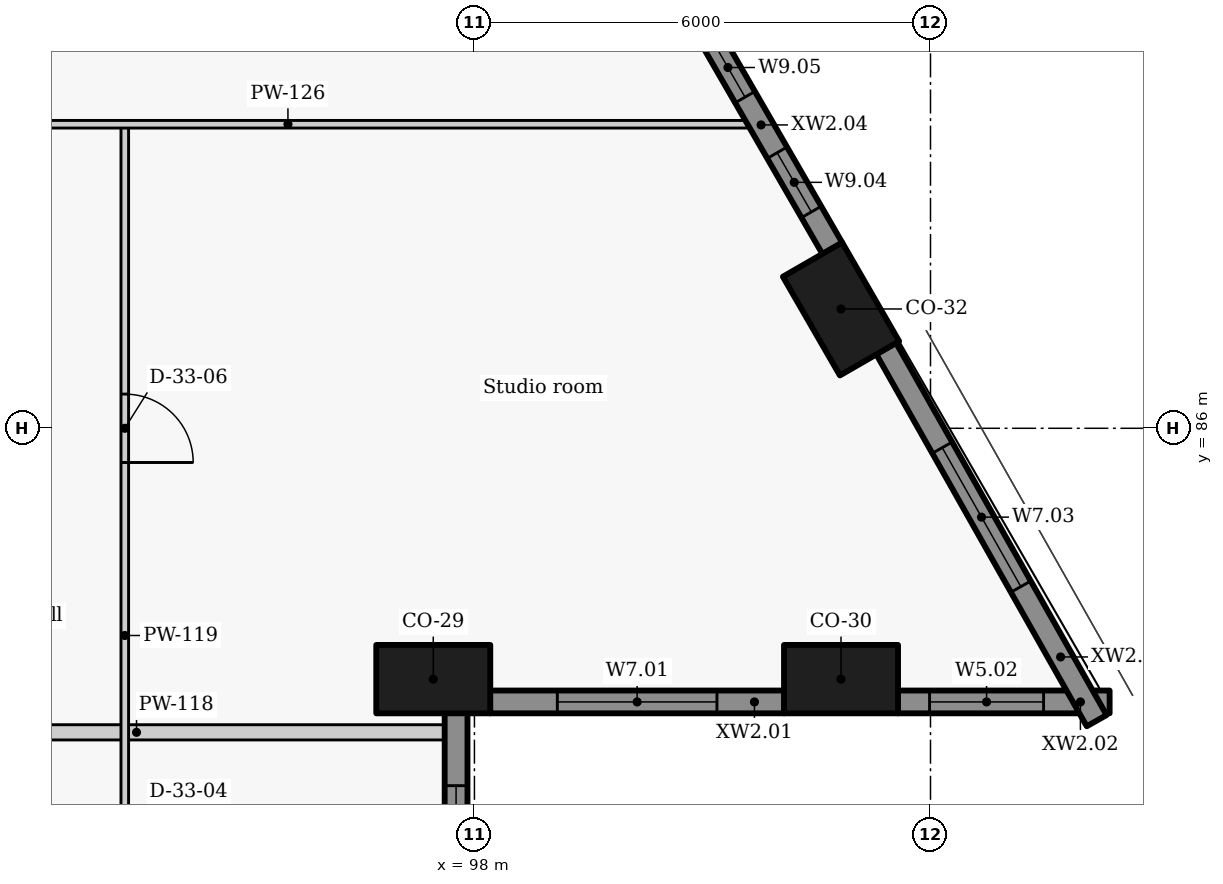
"""IFC4 building model, lengths in metres.
Left out: names, types, materials, properties, quantities, classifications, styles, units other than length and angle.
Written with IfcOpenShell. Run it as: python <this file> out.ifc"""

import sys

from ifc_helpers import new_model, si_unit, direction, frame, frame_2d, origin, origin_2d, place, context, subcontext, project, spatial, rectangle, extrude, element, fill, save


model = new_model("IFC4")
c1 = context("Model", 3, precision=1e-05, world=origin(), true_north=direction((0.0, 1.0)))
c2 = subcontext(c1, "Body", "Model", "MODEL_VIEW")
j1 = project(units=[si_unit("LENGTHUNIT", "METRE"), si_unit("PLANEANGLEUNIT", "RADIAN")], contexts=[c1])
p1 = place(None, origin())
s1 = spatial("IfcSite", under=j1, at=p1, CompositionType="ELEMENT")
p2 = place(p1, origin())
s2 = spatial("IfcBuilding", under=s1, at=p2, CompositionType="ELEMENT")
p3 = place(p2, frame((0.0, 0.0, 44.7)))
s3 = spatial("IfcBuildingStorey", under=s2, at=p3, CompositionType="ELEMENT", Elevation=44.7)
for number, where, z_axis, x_axis in (
    (1, (97.458, 82.7, 0.0), (0.0, 0.0, 1.0), (1.0, 0.0, 0.0)),
    (2, (102.823, 82.7, 0.0), (0.0, 0.0, 1.0), (1.0, 0.0, 0.0)),
    (3, (102.823, 87.57, 0.0), (0.0, 0.0, 1.0), (-0.5, 0.866, 0.0)),
):
    element("IfcColumn", number, at=place(p3, frame(where, z_axis=z_axis, x_axis=x_axis)), inside=s3, PredefinedType="COLUMN", context=c2, shape_type="SweptSolid", body=[
        extrude(rectangle(XDim=1.5, YDim=0.9, at=origin_2d()), origin(), (0.0, 0.0, 1.0), 3.3),
    ])
p4 = place(p3, frame((98.204, 82.4, 0.0), z_axis=(0.0, 0.0, 1.0), x_axis=(1.0, 0.0, 0.0)))
e4 = element("IfcWall", 4, at=p4, inside=s3, PredefinedType="SOLIDWALL", context=c2, shape_type="SweptSolid", body=[
    extrude(rectangle(XDim=3.873, YDim=0.3, at=frame_2d((1.936, 0.0))), origin(), (0.0, 0.0, 1.0), 2.425),
])
p5 = place(p4, frame((0.886, 0.0, 0.9)))
e5 = element("IfcOpeningElement", 5, at=p5, cuts=e4, PredefinedType="OPENING", context=c2, shape_type="SweptSolid", body=[
    extrude(rectangle(XDim=2.1, YDim=1.1, at=frame_2d((1.05, 0.55))), frame((0.0, 0.16, 0.0), z_axis=(0.0, -1.0, 0.0), x_axis=(1.0, 0.0, 0.0)), (0.0, 0.0, 1.0), 0.32),
])
p6 = place(p3, frame((103.569, 82.4, 0.0), z_axis=(0.0, 0.0, 1.0), x_axis=(1.0, 0.0, 0.0)))
e6 = element("IfcWall", 6, at=p6, inside=s3, PredefinedType="SOLIDWALL", context=c2, shape_type="SweptSolid", body=[
    extrude(rectangle(XDim=2.788, YDim=0.3, at=frame_2d((1.394, 0.0))), origin(), (0.0, 0.0, 1.0), 2.425),
])
p7 = place(p6, frame((0.419, 0.0, 0.9)))
e7 = element("IfcOpeningElement", 7, at=p7, cuts=e6, PredefinedType="OPENING", context=c2, shape_type="SweptSolid", body=[
    extrude(rectangle(XDim=1.5, YDim=1.1, at=frame_2d((0.75, 0.55))), frame((0.0, 0.16, 0.0), z_axis=(0.0, -1.0, 0.0), x_axis=(1.0, 0.0, 0.0)), (0.0, 0.0, 1.0), 0.32),
])
p8 = place(p3, frame((106.186, 82.153, 0.0), z_axis=(0.0, 0.0, 1.0), x_axis=(-0.492363204642, 0.870389840655, 0.0)))
e8 = element("IfcWall", 8, at=p8, inside=s3, PredefinedType="SOLIDWALL", context=c2, shape_type="SweptSolid", body=[
    extrude(rectangle(XDim=5.626, YDim=0.3, at=frame_2d((2.813, 0.0))), origin(), (0.0, 0.0, 1.0), 2.425),
])
p9 = place(p8, frame((2.026, 0.0, 0.9)))
e9 = element("IfcOpeningElement", 9, at=p9, cuts=e8, PredefinedType="OPENING", context=c2, shape_type="SweptSolid", body=[
    extrude(rectangle(XDim=2.1, YDim=1.1, at=frame_2d((1.05, 0.55))), frame((0.0, 0.16, 0.0), z_axis=(0.0, -1.0, 0.0), x_axis=(1.0, 0.0, 0.0)), (0.0, 0.0, 1.0), 0.32),
])
p10 = place(p3, frame((102.71, 88.366, 0.0), z_axis=(0.0, 0.0, 1.0), x_axis=(-0.499977402622, 0.866038449993, 0.0)))
e10 = element("IfcWall", 10, at=p10, inside=s3, PredefinedType="SOLIDWALL", context=c2, shape_type="SweptSolid", body=[
    extrude(rectangle(XDim=3.537, YDim=0.3, at=frame_2d((1.769, 0.0))), origin(), (0.0, 0.0, 1.0), 2.425),
])
p11 = place(p10, frame((0.555, 0.0, 0.9)))
e11 = element("IfcOpeningElement", 11, at=p11, cuts=e10, PredefinedType="OPENING", context=c2, shape_type="SweptSolid", body=[
    extrude(rectangle(XDim=0.9, YDim=1.1, at=frame_2d((0.45, 0.55))), frame((0.0, 0.16, 0.0), z_axis=(0.0, -1.0, 0.0), x_axis=(1.0, 0.0, 0.0)), (0.0, 0.0, 1.0), 0.32),
])
p12 = place(p10, frame((2.299, 0.0, 0.9)))
e12 = element("IfcOpeningElement", 12, at=p12, cuts=e10, PredefinedType="OPENING", context=c2, shape_type="SweptSolid", body=[
    extrude(rectangle(XDim=0.9, YDim=1.1, at=frame_2d((0.45, 0.55))), frame((0.0, 0.16, 0.0), z_axis=(0.0, -1.0, 0.0), x_axis=(1.0, 0.0, 0.0)), (0.0, 0.0, 1.0), 0.32),
])
p13 = place(p3, frame((97.758, 78.046, 0.0), z_axis=(0.0, 0.0, 1.0), x_axis=(0.0, 1.0, 0.0)))
e13 = element("IfcWall", 13, at=p13, inside=s3, PredefinedType="SOLIDWALL", context=c2, shape_type="SweptSolid", body=[
    extrude(rectangle(XDim=4.208, YDim=0.3, at=frame_2d((2.104, 0.0))), origin(), (0.0, 0.0, 1.0), 2.425),
])
p14 = place(p13, frame((1.752, 0.0, 0.9)))
e14 = element("IfcOpeningElement", 14, at=p14, cuts=e13, PredefinedType="OPENING", context=c2, shape_type="SweptSolid", body=[
    extrude(rectangle(XDim=1.5, YDim=1.1, at=frame_2d((0.75, 0.55))), frame((0.0, 0.16, 0.0), z_axis=(0.0, -1.0, 0.0), x_axis=(1.0, 0.0, 0.0)), (0.0, 0.0, 1.0), 0.32),
])
p15 = place(p3, frame((89.5, 82.0, 0.0), z_axis=(0.0, 0.0, 1.0), x_axis=(1.0, 0.0, 0.0)))
e15 = element("IfcWall", 15, at=p15, inside=s3, PredefinedType="PARTITIONING", context=c2, shape_type="SweptSolid", body=[
    extrude(rectangle(XDim=8.108, YDim=0.2, at=frame_2d((4.054, 0.0))), origin(), (0.0, 0.0, 1.0), 2.405),
])
p16 = place(p3, frame((93.4, 90.0, 0.0), z_axis=(0.0, 0.0, 1.0), x_axis=(0.0, -1.0, 0.0)))
e16 = element("IfcWall", 16, at=p16, inside=s3, PredefinedType="PARTITIONING", context=c2, shape_type="SweptSolid", body=[
    extrude(rectangle(XDim=18.0, YDim=0.1, at=frame_2d((9.0, 0.0))), origin(), (0.0, 0.0, 1.0), 3.025),
])
p17 = place(p16, frame((16.098, 0.0, 0.0)))
e17 = element("IfcOpeningElement", 17, at=p17, cuts=e16, PredefinedType="OPENING", context=c2, shape_type="SweptSolid", body=[
    extrude(rectangle(XDim=0.9, YDim=2.1, at=frame_2d((0.45, 1.05))), frame((0.0, 0.06, 0.0), z_axis=(0.0, -1.0, 0.0), x_axis=(1.0, 0.0, 0.0)), (0.0, 0.0, 1.0), 0.12),
])
p18 = place(p16, frame((12.55, 0.0, 0.0)))
e18 = element("IfcOpeningElement", 18, at=p18, cuts=e16, PredefinedType="OPENING", context=c2, shape_type="SweptSolid", body=[
    extrude(rectangle(XDim=0.9, YDim=2.1, at=frame_2d((0.45, 1.05))), frame((0.0, 0.06, 0.0), z_axis=(0.0, -1.0, 0.0), x_axis=(1.0, 0.0, 0.0)), (0.0, 0.0, 1.0), 0.12),
])
p19 = place(p16, frame((9.002, 0.0, 0.0)))
e19 = element("IfcOpeningElement", 19, at=p19, cuts=e16, PredefinedType="OPENING", context=c2, shape_type="SweptSolid", body=[
    extrude(rectangle(XDim=0.9, YDim=2.1, at=frame_2d((0.45, 1.05))), frame((0.0, 0.06, 0.0), z_axis=(0.0, -1.0, 0.0), x_axis=(1.0, 0.0, 0.0)), (0.0, 0.0, 1.0), 0.12),
])
p20 = place(p16, frame((3.55, 0.0, 0.0)))
e20 = element("IfcOpeningElement", 20, at=p20, cuts=e16, PredefinedType="OPENING", context=c2, shape_type="SweptSolid", body=[
    extrude(rectangle(XDim=0.9, YDim=2.1, at=frame_2d((0.45, 1.05))), frame((0.0, 0.06, 0.0), z_axis=(0.0, -1.0, 0.0), x_axis=(1.0, 0.0, 0.0)), (0.0, 0.0, 1.0), 0.12),
])
p21 = place(p3, frame((89.5, 90.0, 0.0), z_axis=(0.0, 0.0, 1.0), x_axis=(1.0, 0.0, 0.0)))
e21 = element("IfcWall", 21, at=p21, inside=s3, PredefinedType="PARTITIONING", context=c2, shape_type="SweptSolid", body=[
    extrude(rectangle(XDim=12.093, YDim=0.1, at=frame_2d((6.046, 0.0))), origin(), (0.0, 0.0, 1.0), 2.405),
])
p22 = place(p5, origin())
e22 = element("IfcWindow", 22, at=p22, inside=s3, PartitioningType="SINGLE_PANEL", PredefinedType="WINDOW", context=c2, shape_type="SweptSolid", body=[
    extrude(rectangle(XDim=2.1, YDim=1.1, at=frame_2d((1.05, 0.55))), frame((0.0, 0.03, 0.0), z_axis=(0.0, -1.0, 0.0), x_axis=(1.0, 0.0, 0.0)), (0.0, 0.0, 1.0), 0.06),
])
fill(e5, e22)
p23 = place(p7, origin())
e23 = element("IfcWindow", 23, at=p23, inside=s3, PartitioningType="SINGLE_PANEL", PredefinedType="WINDOW", context=c2, shape_type="SweptSolid", body=[
    extrude(rectangle(XDim=1.5, YDim=1.1, at=frame_2d((0.75, 0.55))), frame((0.0, 0.03, 0.0), z_axis=(0.0, -1.0, 0.0), x_axis=(1.0, 0.0, 0.0)), (0.0, 0.0, 1.0), 0.06),
])
fill(e7, e23)
p24 = place(p9, origin())
e24 = element("IfcWindow", 24, at=p24, inside=s3, PartitioningType="SINGLE_PANEL", PredefinedType="WINDOW", context=c2, shape_type="SweptSolid", body=[
    extrude(rectangle(XDim=2.1, YDim=1.1, at=frame_2d((1.05, 0.55))), frame((0.0, 0.03, 0.0), z_axis=(0.0, -1.0, 0.0), x_axis=(1.0, 0.0, 0.0)), (0.0, 0.0, 1.0), 0.06),
])
fill(e9, e24)
p25 = place(p11, origin())
e25 = element("IfcWindow", 25, at=p25, inside=s3, PartitioningType="SINGLE_PANEL", PredefinedType="WINDOW", context=c2, shape_type="SweptSolid", body=[
    extrude(rectangle(XDim=0.9, YDim=1.1, at=frame_2d((0.45, 0.55))), frame((0.0, 0.03, 0.0), z_axis=(0.0, -1.0, 0.0), x_axis=(1.0, 0.0, 0.0)), (0.0, 0.0, 1.0), 0.06),
])
fill(e11, e25)
p26 = place(p12, origin())
e26 = element("IfcWindow", 26, at=p26, inside=s3, PartitioningType="SINGLE_PANEL", PredefinedType="WINDOW", context=c2, shape_type="SweptSolid", body=[
    extrude(rectangle(XDim=0.9, YDim=1.1, at=frame_2d((0.45, 0.55))), frame((0.0, 0.03, 0.0), z_axis=(0.0, -1.0, 0.0), x_axis=(1.0, 0.0, 0.0)), (0.0, 0.0, 1.0), 0.06),
])
fill(e12, e26)
p27 = place(p14, origin())
e27 = element("IfcWindow", 27, at=p27, inside=s3, PartitioningType="SINGLE_PANEL", PredefinedType="WINDOW", context=c2, shape_type="SweptSolid", body=[
    extrude(rectangle(XDim=1.5, YDim=1.1, at=frame_2d((0.75, 0.55))), frame((0.0, 0.03, 0.0), z_axis=(0.0, -1.0, 0.0), x_axis=(1.0, 0.0, 0.0)), (0.0, 0.0, 1.0), 0.06),
])
fill(e14, e27)
p28 = place(p20, origin())
e28 = element("IfcDoor", 28, at=p28, inside=s3, OperationType="SINGLE_SWING_RIGHT", PredefinedType="DOOR", context=c2, shape_type="SweptSolid", body=[
    extrude(rectangle(XDim=0.9, YDim=2.1, at=frame_2d((0.45, 1.05))), frame((0.0, 0.025, 0.0), z_axis=(0.0, -1.0, 0.0), x_axis=(1.0, 0.0, 0.0)), (0.0, 0.0, 1.0), 0.05),
])
fill(e20, e28)
save(model, sys.argv[1])
